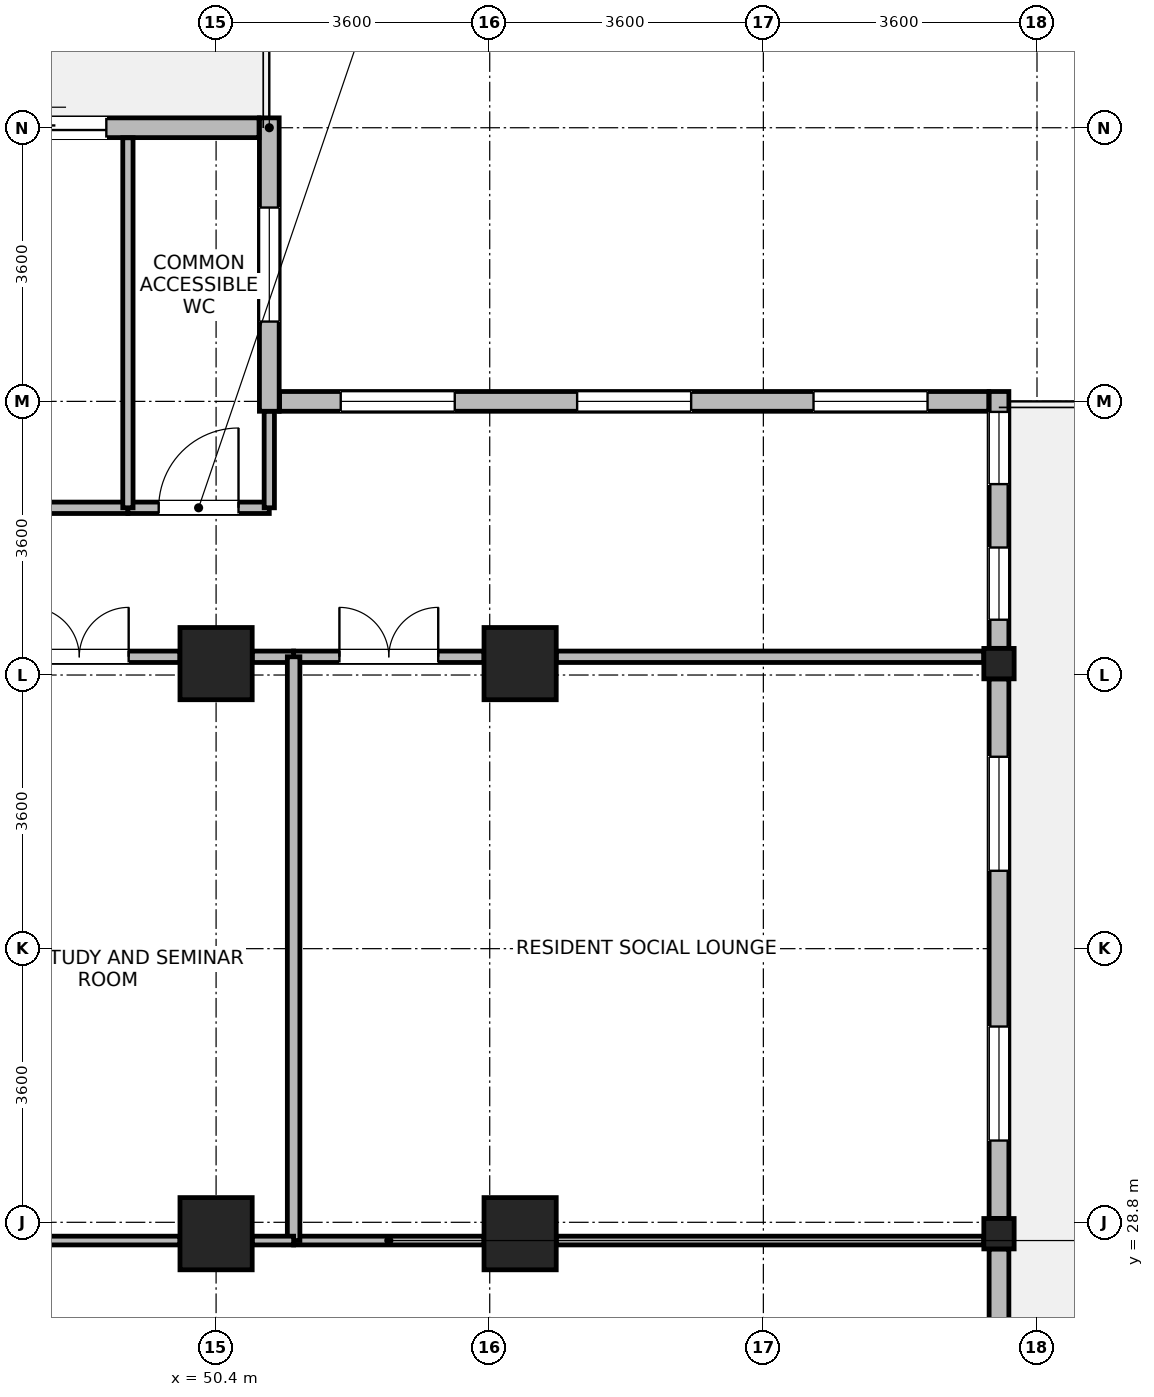
"""IFC4 building model, lengths in metres.
Left out: names, types, materials, properties, quantities, classifications, styles, units other than length and angle.
Written with IfcOpenShell. Run it as: python <this file> out.ifc"""

import sys

from ifc_helpers import new_model, si_unit, direction, frame, frame_2d, origin, origin_2d, place, context, subcontext, project, spatial, rectangle, i_section, extrude, source, transform, mapped, element, fill, save


model = new_model("IFC4")
c1 = context("Model", 3, precision=1e-05, world=origin(), true_north=direction((0.0, 1.0)))
c2 = subcontext(c1, "Body", "Model", "MODEL_VIEW")
j1 = project(units=[si_unit("LENGTHUNIT", "METRE"), si_unit("PLANEANGLEUNIT", "RADIAN")], contexts=[c1])
p1 = place(None, origin())
s1 = spatial("IfcSite", under=j1, at=p1, CompositionType="ELEMENT")
p2 = place(p1, origin())
s2 = spatial("IfcBuilding", under=s1, at=p2, CompositionType="ELEMENT")
p3 = place(p2, frame((0.0, 0.0, 224.0)))
s3 = spatial("IfcBuildingStorey", under=s2, at=p3, CompositionType="ELEMENT", Elevation=224.0)
m1 = source(origin(), c2, "Body", "SweptSolid", [
    extrude(rectangle(XDim=0.95, YDim=0.95, at=origin_2d()), origin(), (0.0, 0.0, 1.0), 3.7),
])
for number, where, z_axis, x_axis in (
    (1, (50.4, 28.65, 0.0), (0.0, 0.0, 1.0), (1.0, 0.0, 0.0)),
    (2, (50.4, 36.15, 0.0), (0.0, 0.0, 1.0), (1.0, 0.0, 0.0)),
    (3, (54.4, 28.65, 0.0), (0.0, 0.0, 1.0), (1.0, 0.0, 0.0)),
    (4, (54.4, 36.15, 0.0), (0.0, 0.0, 1.0), (1.0, 0.0, 0.0)),
):
    element("IfcColumn", number, at=place(p3, frame(where, z_axis=z_axis, x_axis=x_axis)), inside=s3, PredefinedType="COLUMN", context=c2, shape_type="MappedRepresentation", body=[
        mapped(m1, transform((0.0, 0.0, 0.0), x_axis=(1.0, 0.0, 0.0), y_axis=(0.0, 1.0, 0.0), z_axis=(0.0, 0.0, 1.0), scale=1.0)),
    ])
m2 = source(origin(), c2, "Body", "SweptSolid", [
    extrude(i_section(OverallWidth=0.399, OverallDepth=0.4, WebThickness=0.017, FlangeThickness=0.023, FilletRadius=0.015, at=origin_2d()), origin(), (0.0, 0.0, 1.0), 3.7),
])
for number, where, z_axis, x_axis in (
    (5, (60.7, 28.65, 0.0), (0.0, 0.0, 1.0), (1.0, 0.0, 0.0)),
    (6, (60.7, 36.15, 0.0), (0.0, 0.0, 1.0), (1.0, 0.0, 0.0)),
):
    element("IfcColumn", number, at=place(p3, frame(where, z_axis=z_axis, x_axis=x_axis)), inside=s3, PredefinedType="COLUMN", context=c2, shape_type="MappedRepresentation", body=[
        mapped(m2, transform((0.0, 0.0, 0.0), x_axis=(1.0, 0.0, 0.0), y_axis=(0.0, 1.0, 0.0), z_axis=(0.0, 0.0, 1.0), scale=1.0)),
    ])
p4 = place(p3, frame((60.7, 28.449, 0.0), z_axis=(0.0, 0.0, 1.0), x_axis=(0.0, -1.0, 0.0)))
e7 = element("IfcWall", 7, at=p4, inside=s3, PredefinedType="STANDARD", context=c2, shape_type="SweptSolid", body=[
    extrude(rectangle(XDim=6.648, YDim=0.26, at=frame_2d((3.324, 0.0))), origin(), (0.0, 0.0, 1.0), 3.05),
])
p5 = place(p4, frame((4.236, 0.0, 0.85)))
e8 = element("IfcOpeningElement", 8, at=p5, cuts=e7, PredefinedType="OPENING", context=c2, shape_type="SweptSolid", body=[
    extrude(rectangle(XDim=1.5, YDim=1.85, at=frame_2d((0.75, 0.925))), frame((0.0, 0.14, 0.0), z_axis=(0.0, -1.0, 0.0), x_axis=(1.0, 0.0, 0.0)), (0.0, 0.0, 1.0), 0.28),
])
p6 = place(p4, frame((2.849, 0.0, 0.85)))
e9 = element("IfcOpeningElement", 9, at=p6, cuts=e7, PredefinedType="OPENING", context=c2, shape_type="SweptSolid", body=[
    extrude(rectangle(XDim=0.95, YDim=1.75, at=frame_2d((0.475, 0.875))), frame((0.0, 0.14, 0.0), z_axis=(0.0, -1.0, 0.0), x_axis=(1.0, 0.0, 0.0)), (0.0, 0.0, 1.0), 0.28),
])
p7 = place(p3, frame((60.7, 35.949, 0.0), z_axis=(0.0, 0.0, 1.0), x_axis=(0.0, -1.0, 0.0)))
e10 = element("IfcWall", 10, at=p7, inside=s3, PredefinedType="STANDARD", context=c2, shape_type="SweptSolid", body=[
    extrude(rectangle(XDim=7.098, YDim=0.26, at=frame_2d((3.549, 0.0))), origin(), (0.0, 0.0, 1.0), 3.05),
])
p8 = place(p7, frame((1.024, 0.0, 0.85)))
e11 = element("IfcOpeningElement", 11, at=p8, cuts=e10, PredefinedType="OPENING", context=c2, shape_type="SweptSolid", body=[
    extrude(rectangle(XDim=1.5, YDim=1.85, at=frame_2d((0.75, 0.925))), frame((0.0, 0.14, 0.0), z_axis=(0.0, -1.0, 0.0), x_axis=(1.0, 0.0, 0.0)), (0.0, 0.0, 1.0), 0.28),
])
p9 = place(p7, frame((4.573, 0.0, 0.85)))
e12 = element("IfcOpeningElement", 12, at=p9, cuts=e10, PredefinedType="OPENING", context=c2, shape_type="SweptSolid", body=[
    extrude(rectangle(XDim=1.5, YDim=1.85, at=frame_2d((0.75, 0.925))), frame((0.0, 0.14, 0.0), z_axis=(0.0, -1.0, 0.0), x_axis=(1.0, 0.0, 0.0)), (0.0, 0.0, 1.0), 0.28),
])
p10 = place(p3, frame((60.7, 39.73, 0.0), z_axis=(0.0, 0.0, 1.0), x_axis=(0.0, -1.0, 0.0)))
e13 = element("IfcWall", 13, at=p10, inside=s3, PredefinedType="STANDARD", context=c2, shape_type="SweptSolid", body=[
    extrude(rectangle(XDim=3.379, YDim=0.26, at=frame_2d((1.689, 0.0))), origin(), (0.0, 0.0, 1.0), 3.45),
])
p11 = place(p10, frame((2.052, 0.0, 0.85)))
e14 = element("IfcOpeningElement", 14, at=p11, cuts=e13, PredefinedType="OPENING", context=c2, shape_type="SweptSolid", body=[
    extrude(rectangle(XDim=0.95, YDim=1.75, at=frame_2d((0.475, 0.875))), frame((0.0, 0.14, 0.0), z_axis=(0.0, -1.0, 0.0), x_axis=(1.0, 0.0, 0.0)), (0.0, 0.0, 1.0), 0.28),
])
p12 = place(p10, frame((0.268, 0.0, 0.85)))
e15 = element("IfcOpeningElement", 15, at=p12, cuts=e13, PredefinedType="OPENING", context=c2, shape_type="SweptSolid", body=[
    extrude(rectangle(XDim=0.95, YDim=1.75, at=frame_2d((0.475, 0.875))), frame((0.0, 0.14, 0.0), z_axis=(0.0, -1.0, 0.0), x_axis=(1.0, 0.0, 0.0)), (0.0, 0.0, 1.0), 0.28),
])
p13 = place(p3, frame((51.235, 39.6, 0.0), z_axis=(0.0, 0.0, 1.0), x_axis=(1.0, 0.0, 0.0)))
e16 = element("IfcWall", 16, at=p13, inside=s3, PredefinedType="STANDARD", context=c2, shape_type="SweptSolid", body=[
    extrude(rectangle(XDim=9.33, YDim=0.26, at=frame_2d((4.665, 0.0))), origin(), (0.0, 0.0, 1.0), 3.45),
])
p14 = place(p13, frame((0.805, 0.0, 0.85)))
e17 = element("IfcOpeningElement", 17, at=p14, cuts=e16, PredefinedType="OPENING", context=c2, shape_type="SweptSolid", body=[
    extrude(rectangle(XDim=1.5, YDim=1.85, at=frame_2d((0.75, 0.925))), frame((0.0, 0.14, 0.0), z_axis=(0.0, -1.0, 0.0), x_axis=(1.0, 0.0, 0.0)), (0.0, 0.0, 1.0), 0.28),
])
p15 = place(p13, frame((3.915, 0.0, 0.85)))
e18 = element("IfcOpeningElement", 18, at=p15, cuts=e16, PredefinedType="OPENING", context=c2, shape_type="SweptSolid", body=[
    extrude(rectangle(XDim=1.5, YDim=1.85, at=frame_2d((0.75, 0.925))), frame((0.0, 0.14, 0.0), z_axis=(0.0, -1.0, 0.0), x_axis=(1.0, 0.0, 0.0)), (0.0, 0.0, 1.0), 0.28),
])
p16 = place(p13, frame((7.025, 0.0, 0.85)))
e19 = element("IfcOpeningElement", 19, at=p16, cuts=e16, PredefinedType="OPENING", context=c2, shape_type="SweptSolid", body=[
    extrude(rectangle(XDim=1.5, YDim=1.85, at=frame_2d((0.75, 0.925))), frame((0.0, 0.14, 0.0), z_axis=(0.0, -1.0, 0.0), x_axis=(1.0, 0.0, 0.0)), (0.0, 0.0, 1.0), 0.28),
])
p17 = place(p3, frame((51.1, 43.33, 0.0), z_axis=(0.0, 0.0, 1.0), x_axis=(0.0, -1.0, 0.0)))
e20 = element("IfcWall", 20, at=p17, inside=s3, PredefinedType="STANDARD", context=c2, shape_type="SweptSolid", body=[
    extrude(rectangle(XDim=3.86, YDim=0.26, at=frame_2d((1.93, 0.0))), origin(), (0.0, 0.0, 1.0), 3.45),
])
p18 = place(p17, frame((1.18, 0.0, 0.85)))
e21 = element("IfcOpeningElement", 21, at=p18, cuts=e20, PredefinedType="OPENING", context=c2, shape_type="SweptSolid", body=[
    extrude(rectangle(XDim=1.5, YDim=1.85, at=frame_2d((0.75, 0.925))), frame((0.0, 0.14, 0.0), z_axis=(0.0, -1.0, 0.0), x_axis=(1.0, 0.0, 0.0)), (0.0, 0.0, 1.0), 0.28),
])
p19 = place(p3, frame((47.276, 43.2, 0.0), z_axis=(0.0, 0.0, 1.0), x_axis=(1.0, 0.0, 0.0)))
e22 = element("IfcWall", 22, at=p19, inside=s3, PredefinedType="STANDARD", context=c2, shape_type="SweptSolid", body=[
    extrude(rectangle(XDim=3.689, YDim=0.26, at=frame_2d((1.845, 0.0))), origin(), (0.0, 0.0, 1.0), 3.45),
])
p20 = place(p19, frame((0.18, 0.0, 0.0)))
e23 = element("IfcOpeningElement", 23, at=p20, cuts=e22, PredefinedType="OPENING", context=c2, shape_type="SweptSolid", body=[
    extrude(rectangle(XDim=1.5, YDim=2.15, at=frame_2d((0.75, 1.075))), frame((0.0, 0.14, 0.0), z_axis=(0.0, -1.0, 0.0), x_axis=(1.0, 0.0, 0.0)), (0.0, 0.0, 1.0), 0.28),
])
p21 = place(p3, frame((38.8, 38.2, 0.0), z_axis=(0.0, 0.0, 1.0), x_axis=(1.0, 0.0, 0.0)))
e24 = element("IfcWall", 24, at=p21, inside=s3, PredefinedType="PARTITIONING", context=c2, shape_type="SweptSolid", body=[
    extrude(rectangle(XDim=10.44, YDim=0.15, at=frame_2d((5.22, 0.0))), origin(), (0.0, 0.0, 1.0), 3.45),
])
p22 = place(p21, frame((4.77, 0.0, 0.0)))
e25 = element("IfcOpeningElement", 25, at=p22, cuts=e24, PredefinedType="OPENING", context=c2, shape_type="SweptSolid", body=[
    extrude(rectangle(XDim=0.9, YDim=2.08, at=frame_2d((0.45, 1.04))), frame((0.0, 0.085, 0.0), z_axis=(0.0, -1.0, 0.0), x_axis=(1.0, 0.0, 0.0)), (0.0, 0.0, 1.0), 0.17),
])
p23 = place(p3, frame((51.42, 36.24, 0.0), z_axis=(0.0, 0.0, 1.0), x_axis=(1.0, 0.0, 0.0)))
e26 = element("IfcWall", 26, at=p23, inside=s3, PredefinedType="PARTITIONING", context=c2, shape_type="SweptSolid", body=[
    extrude(rectangle(XDim=2.505, YDim=0.15, at=frame_2d((1.252, 0.0))), origin(), (0.0, 0.0, 1.0), 2.9),
])
p24 = place(p23, frame((0.603, 0.0, 0.0)))
e27 = element("IfcOpeningElement", 27, at=p24, cuts=e26, PredefinedType="OPENING", context=c2, shape_type="SweptSolid", body=[
    extrude(rectangle(XDim=1.3, YDim=2.12, at=frame_2d((0.65, 1.06))), frame((0.0, 0.085, 0.0), z_axis=(0.0, -1.0, 0.0), x_axis=(1.0, 0.0, 0.0)), (0.0, 0.0, 1.0), 0.17),
])
p25 = place(p3, frame((54.875, 36.24, 0.0), z_axis=(0.0, 0.0, 1.0), x_axis=(1.0, 0.0, 0.0)))
e28 = element("IfcWall", 28, at=p25, inside=s3, PredefinedType="PARTITIONING", context=c2, shape_type="SweptSolid", body=[
    extrude(rectangle(XDim=5.625, YDim=0.15, at=frame_2d((2.813, 0.0))), origin(), (0.0, 0.0, 1.0), 2.9),
])
p26 = place(p3, frame((47.275, 36.24, 0.0), z_axis=(0.0, 0.0, 1.0), x_axis=(1.0, 0.0, 0.0)))
e29 = element("IfcWall", 29, at=p26, inside=s3, PredefinedType="PARTITIONING", context=c2, shape_type="SweptSolid", body=[
    extrude(rectangle(XDim=2.65, YDim=0.15, at=frame_2d((1.325, 0.0))), origin(), (0.0, 0.0, 1.0), 2.9),
])
p27 = place(p26, frame((0.675, 0.0, 0.0)))
e30 = element("IfcOpeningElement", 30, at=p27, cuts=e29, PredefinedType="OPENING", context=c2, shape_type="SweptSolid", body=[
    extrude(rectangle(XDim=1.3, YDim=2.12, at=frame_2d((0.65, 1.06))), frame((0.0, 0.085, 0.0), z_axis=(0.0, -1.0, 0.0), x_axis=(1.0, 0.0, 0.0)), (0.0, 0.0, 1.0), 0.17),
])
p28 = place(p3, frame((50.875, 36.24, 0.0), z_axis=(0.0, 0.0, 1.0), x_axis=(1.0, 0.0, 0.0)))
e31 = element("IfcWall", 31, at=p28, inside=s3, PredefinedType="PARTITIONING", context=c2, shape_type="SweptSolid", body=[
    extrude(rectangle(XDim=0.545, YDim=0.15, at=frame_2d((0.272, 0.0))), origin(), (0.0, 0.0, 1.0), 2.9),
])
p29 = place(p3, frame((49.24, 38.2, 0.0), z_axis=(0.0, 0.0, 1.0), x_axis=(1.0, 0.0, 0.0)))
e32 = element("IfcWall", 32, at=p29, inside=s3, PredefinedType="PARTITIONING", context=c2, shape_type="SweptSolid", body=[
    extrude(rectangle(XDim=1.86, YDim=0.15, at=frame_2d((0.93, 0.0))), origin(), (0.0, 0.0, 1.0), 3.45),
])
p30 = place(p29, frame((0.405, 0.0, 0.0)))
e33 = element("IfcOpeningElement", 33, at=p30, cuts=e32, PredefinedType="OPENING", context=c2, shape_type="SweptSolid", body=[
    extrude(rectangle(XDim=1.05, YDim=2.12, at=frame_2d((0.525, 1.06))), frame((0.0, 0.085, 0.0), z_axis=(0.0, -1.0, 0.0), x_axis=(1.0, 0.0, 0.0)), (0.0, 0.0, 1.0), 0.17),
])
p31 = place(p3, frame((51.42, 28.56, 0.0), z_axis=(0.0, 0.0, 1.0), x_axis=(1.0, 0.0, 0.0)))
e34 = element("IfcWall", 34, at=p31, inside=s3, PredefinedType="PARTITIONING", context=c2, shape_type="SweptSolid", body=[
    extrude(rectangle(XDim=2.505, YDim=0.115, at=frame_2d((1.252, 0.0))), origin(), (0.0, 0.0, 1.0), 2.9),
])
p32 = place(p3, frame((54.875, 28.56, 0.0), z_axis=(0.0, 0.0, 1.0), x_axis=(1.0, 0.0, 0.0)))
e35 = element("IfcWall", 35, at=p32, inside=s3, PredefinedType="PARTITIONING", context=c2, shape_type="SweptSolid", body=[
    extrude(rectangle(XDim=5.625, YDim=0.115, at=frame_2d((2.813, 0.0))), origin(), (0.0, 0.0, 1.0), 2.9),
])
p33 = place(p3, frame((51.42, 28.56, 0.0), z_axis=(0.0, 0.0, 1.0), x_axis=(0.0, 1.0, 0.0)))
e36 = element("IfcWall", 36, at=p33, inside=s3, PredefinedType="PARTITIONING", context=c2, shape_type="SweptSolid", body=[
    extrude(rectangle(XDim=7.68, YDim=0.165, at=frame_2d((3.84, 0.0))), origin(), (0.0, 0.0, 1.0), 3.45),
])
p34 = place(p3, frame((49.24, 38.2, 0.0), z_axis=(0.0, 0.0, 1.0), x_axis=(0.0, 1.0, 0.0)))
e37 = element("IfcWall", 37, at=p34, inside=s3, PredefinedType="PARTITIONING", context=c2, shape_type="SweptSolid", body=[
    extrude(rectangle(XDim=4.868, YDim=0.135, at=frame_2d((2.434, 0.0))), origin(), (0.0, 0.0, 1.0), 3.45),
])
p35 = place(p3, frame((51.1, 38.2, 0.0), z_axis=(0.0, 0.0, 1.0), x_axis=(0.0, 1.0, 0.0)))
e38 = element("IfcWall", 38, at=p35, inside=s3, PredefinedType="PARTITIONING", context=c2, shape_type="SweptSolid", body=[
    extrude(rectangle(XDim=1.268, YDim=0.135, at=frame_2d((0.634, 0.0))), origin(), (0.0, 0.0, 1.0), 3.45),
])
p36 = place(p3, frame((47.275, 28.56, 0.0), z_axis=(0.0, 0.0, 1.0), x_axis=(1.0, 0.0, 0.0)))
e39 = element("IfcWall", 39, at=p36, inside=s3, PredefinedType="PARTITIONING", context=c2, shape_type="SweptSolid", body=[
    extrude(rectangle(XDim=2.65, YDim=0.115, at=frame_2d((1.325, 0.0))), origin(), (0.0, 0.0, 1.0), 2.9),
])
p37 = place(p3, frame((50.875, 28.56, 0.0), z_axis=(0.0, 0.0, 1.0), x_axis=(1.0, 0.0, 0.0)))
e40 = element("IfcWall", 40, at=p37, inside=s3, PredefinedType="PARTITIONING", context=c2, shape_type="SweptSolid", body=[
    extrude(rectangle(XDim=0.545, YDim=0.115, at=frame_2d((0.272, 0.0))), origin(), (0.0, 0.0, 1.0), 2.9),
])
p38 = place(p8, origin())
e41 = element("IfcWindow", 41, at=p38, inside=s3, PartitioningType="SINGLE_PANEL", PredefinedType="WINDOW", context=c2, shape_type="SweptSolid", body=[
    extrude(rectangle(XDim=1.5, YDim=1.85, at=frame_2d((0.75, 0.925))), frame((0.0, 0.03, 0.0), z_axis=(0.0, -1.0, 0.0), x_axis=(1.0, 0.0, 0.0)), (0.0, 0.0, 1.0), 0.06),
])
fill(e11, e41)
p39 = place(p9, origin())
e42 = element("IfcWindow", 42, at=p39, inside=s3, PartitioningType="SINGLE_PANEL", PredefinedType="WINDOW", context=c2, shape_type="SweptSolid", body=[
    extrude(rectangle(XDim=1.5, YDim=1.85, at=frame_2d((0.75, 0.925))), frame((0.0, 0.03, 0.0), z_axis=(0.0, -1.0, 0.0), x_axis=(1.0, 0.0, 0.0)), (0.0, 0.0, 1.0), 0.06),
])
fill(e12, e42)
p40 = place(p11, origin())
e43 = element("IfcWindow", 43, at=p40, inside=s3, PartitioningType="SINGLE_PANEL", PredefinedType="WINDOW", context=c2, shape_type="SweptSolid", body=[
    extrude(rectangle(XDim=0.95, YDim=1.75, at=frame_2d((0.475, 0.875))), frame((0.0, 0.03, 0.0), z_axis=(0.0, -1.0, 0.0), x_axis=(1.0, 0.0, 0.0)), (0.0, 0.0, 1.0), 0.06),
])
fill(e14, e43)
p41 = place(p12, origin())
e44 = element("IfcWindow", 44, at=p41, inside=s3, PartitioningType="SINGLE_PANEL", PredefinedType="WINDOW", context=c2, shape_type="SweptSolid", body=[
    extrude(rectangle(XDim=0.95, YDim=1.75, at=frame_2d((0.475, 0.875))), frame((0.0, 0.03, 0.0), z_axis=(0.0, -1.0, 0.0), x_axis=(1.0, 0.0, 0.0)), (0.0, 0.0, 1.0), 0.06),
])
fill(e15, e44)
p42 = place(p14, origin())
e45 = element("IfcWindow", 45, at=p42, inside=s3, PartitioningType="SINGLE_PANEL", PredefinedType="WINDOW", context=c2, shape_type="SweptSolid", body=[
    extrude(rectangle(XDim=1.5, YDim=1.85, at=frame_2d((0.75, 0.925))), frame((0.0, 0.03, 0.0), z_axis=(0.0, -1.0, 0.0), x_axis=(1.0, 0.0, 0.0)), (0.0, 0.0, 1.0), 0.06),
])
fill(e17, e45)
p43 = place(p15, origin())
e46 = element("IfcWindow", 46, at=p43, inside=s3, PartitioningType="SINGLE_PANEL", PredefinedType="WINDOW", context=c2, shape_type="SweptSolid", body=[
    extrude(rectangle(XDim=1.5, YDim=1.85, at=frame_2d((0.75, 0.925))), frame((0.0, 0.03, 0.0), z_axis=(0.0, -1.0, 0.0), x_axis=(1.0, 0.0, 0.0)), (0.0, 0.0, 1.0), 0.06),
])
fill(e18, e46)
p44 = place(p16, origin())
e47 = element("IfcWindow", 47, at=p44, inside=s3, PartitioningType="SINGLE_PANEL", PredefinedType="WINDOW", context=c2, shape_type="SweptSolid", body=[
    extrude(rectangle(XDim=1.5, YDim=1.85, at=frame_2d((0.75, 0.925))), frame((0.0, 0.03, 0.0), z_axis=(0.0, -1.0, 0.0), x_axis=(1.0, 0.0, 0.0)), (0.0, 0.0, 1.0), 0.06),
])
fill(e19, e47)
p45 = place(p18, origin())
e48 = element("IfcWindow", 48, at=p45, inside=s3, PartitioningType="SINGLE_PANEL", PredefinedType="WINDOW", context=c2, shape_type="SweptSolid", body=[
    extrude(rectangle(XDim=1.5, YDim=1.85, at=frame_2d((0.75, 0.925))), frame((0.0, 0.03, 0.0), z_axis=(0.0, -1.0, 0.0), x_axis=(1.0, 0.0, 0.0)), (0.0, 0.0, 1.0), 0.06),
])
fill(e21, e48)
p46 = place(p20, origin())
e49 = element("IfcDoor", 49, at=p46, inside=s3, OperationType="SLIDING_TO_LEFT", PredefinedType="DOOR", context=c2, shape_type="SweptSolid", body=[
    extrude(rectangle(XDim=1.5, YDim=2.15, at=frame_2d((0.75, 1.075))), frame((0.0, 0.025, 0.0), z_axis=(0.0, -1.0, 0.0), x_axis=(1.0, 0.0, 0.0)), (0.0, 0.0, 1.0), 0.05),
])
fill(e23, e49)
p47 = place(p24, origin())
e50 = element("IfcDoor", 50, at=p47, inside=s3, OperationType="DOUBLE_DOOR_SINGLE_SWING", PredefinedType="DOOR", context=c2, shape_type="SweptSolid", body=[
    extrude(rectangle(XDim=1.3, YDim=2.12, at=frame_2d((0.65, 1.06))), frame((0.0, 0.025, 0.0), z_axis=(0.0, -1.0, 0.0), x_axis=(1.0, 0.0, 0.0)), (0.0, 0.0, 1.0), 0.05),
])
fill(e27, e50)
p48 = place(p27, origin())
e51 = element("IfcDoor", 51, at=p48, inside=s3, OperationType="DOUBLE_DOOR_SINGLE_SWING", PredefinedType="DOOR", context=c2, shape_type="SweptSolid", body=[
    extrude(rectangle(XDim=1.3, YDim=2.12, at=frame_2d((0.65, 1.06))), frame((0.0, 0.025, 0.0), z_axis=(0.0, -1.0, 0.0), x_axis=(1.0, 0.0, 0.0)), (0.0, 0.0, 1.0), 0.05),
])
fill(e30, e51)
p49 = place(p30, origin())
e52 = element("IfcDoor", 52, at=p49, inside=s3, OperationType="SINGLE_SWING_RIGHT", PredefinedType="DOOR", context=c2, shape_type="SweptSolid", body=[
    extrude(rectangle(XDim=1.05, YDim=2.12, at=frame_2d((0.525, 1.06))), frame((0.0, 0.025, 0.0), z_axis=(0.0, -1.0, 0.0), x_axis=(1.0, 0.0, 0.0)), (0.0, 0.0, 1.0), 0.05),
])
fill(e33, e52)
save(model, sys.argv[1])
